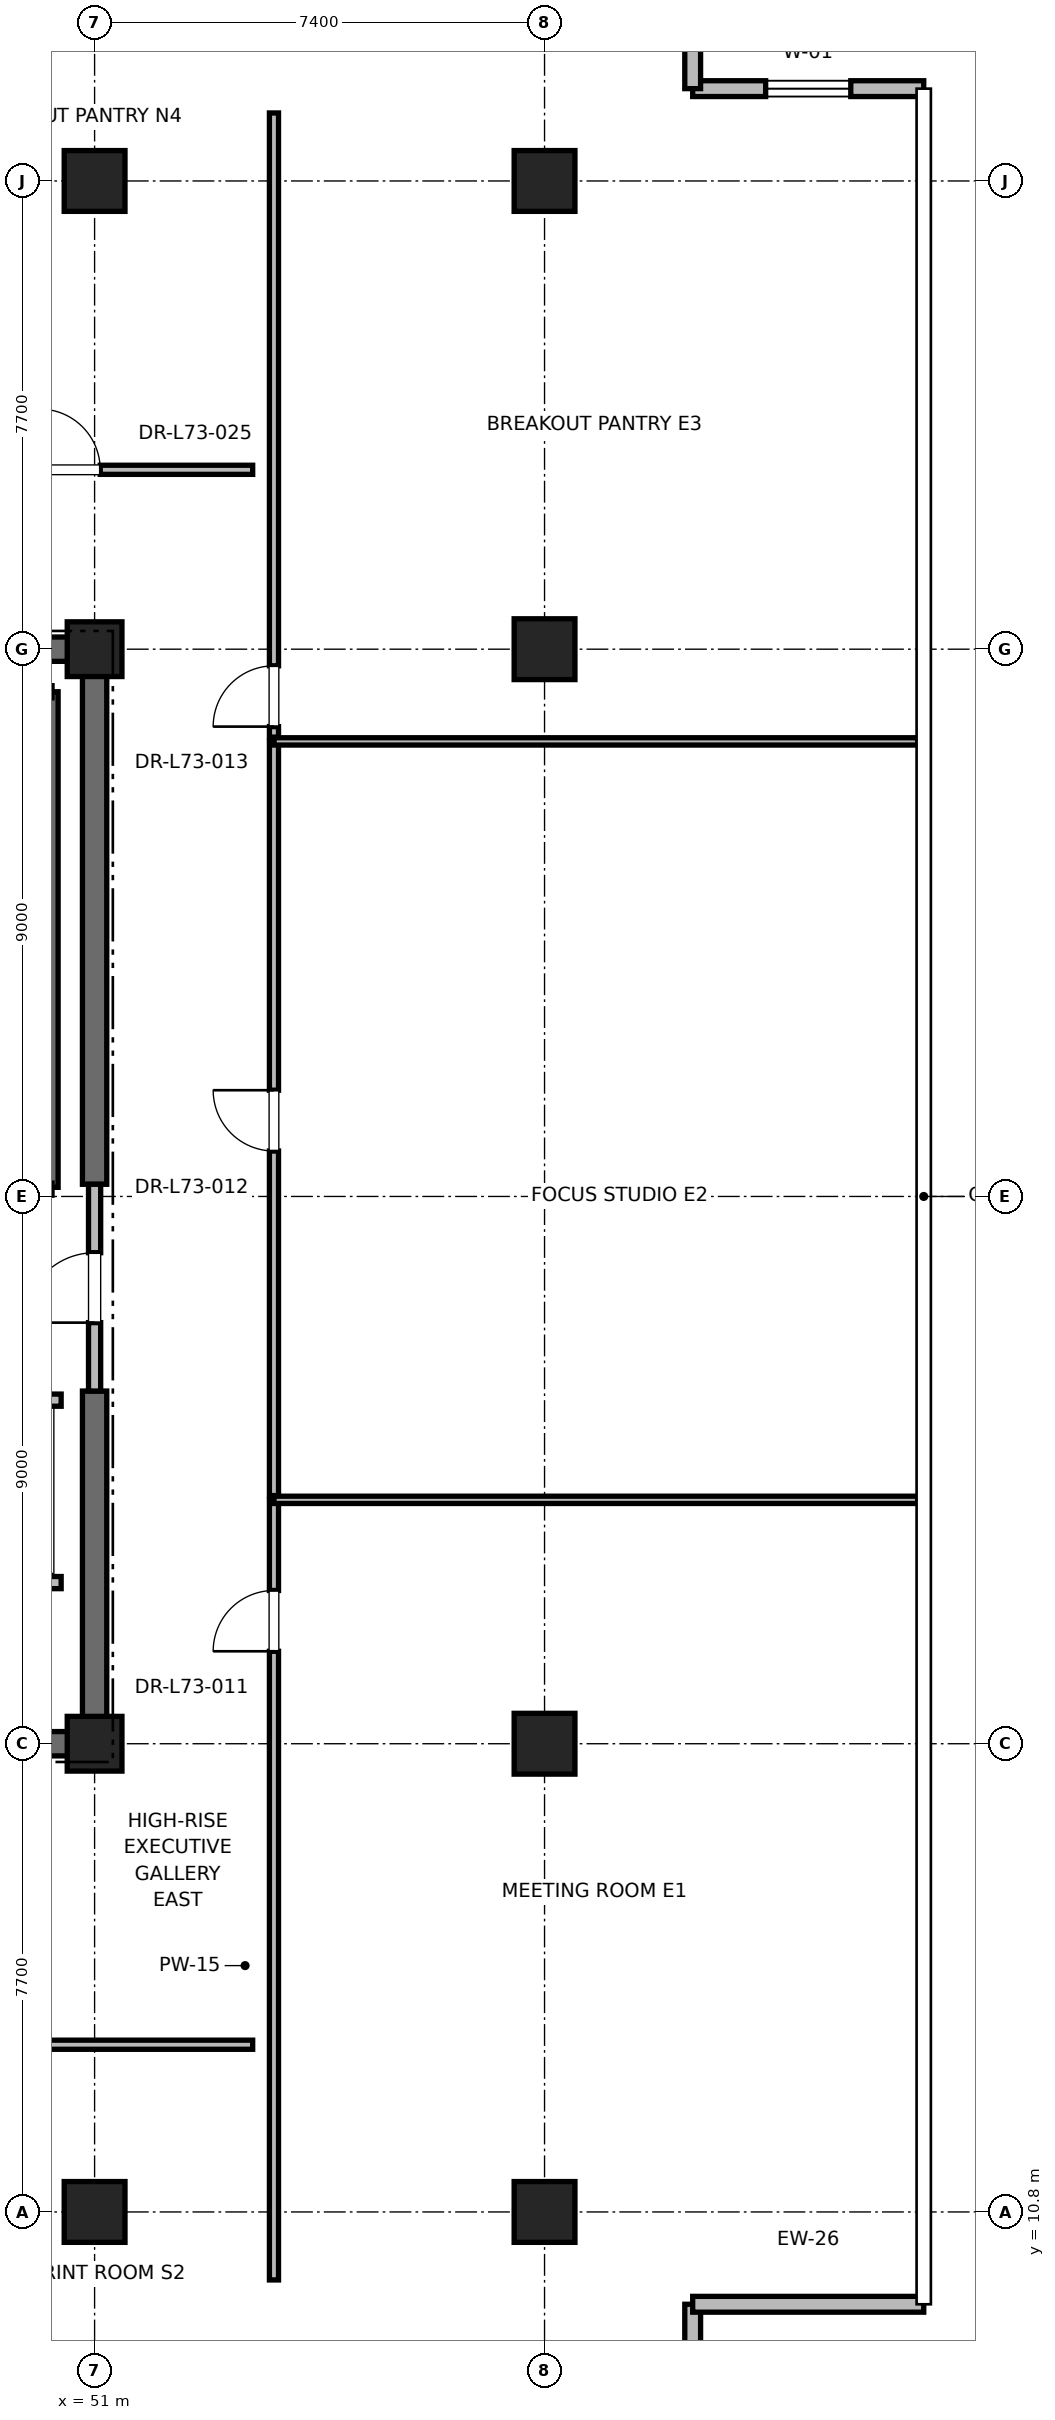
"""IFC4 building model, lengths in metres.
Left out: names, types, materials, properties, quantities, classifications, styles, units other than length and angle.
Written with IfcOpenShell. Run it as: python <this file> out.ifc"""

import sys

from ifc_helpers import new_model, si_unit, direction, frame, frame_2d, origin, origin_2d, place, context, subcontext, project, spatial, rectangle, extrude, element, fill, save


model = new_model("IFC4")
c1 = context("Model", 3, precision=1e-05, world=origin(), true_north=direction((0.0, 1.0)))
c2 = subcontext(c1, "Body", "Model", "MODEL_VIEW")
j1 = project(units=[si_unit("LENGTHUNIT", "METRE"), si_unit("PLANEANGLEUNIT", "RADIAN")], contexts=[c1])
p1 = place(None, origin())
s1 = spatial("IfcSite", under=j1, at=p1, CompositionType="ELEMENT")
p2 = place(p1, origin())
s2 = spatial("IfcBuilding", under=s1, at=p2, CompositionType="ELEMENT")
p3 = place(p2, frame((0.0, 0.0, 314.8)))
s3 = spatial("IfcBuildingStorey", under=s2, at=p3, CompositionType="ELEMENT", Elevation=314.8)
for number, where, z_axis, x_axis in (
    (1, (51.0, 10.8, 0.0), (0.0, 0.0, 1.0), (1.0, 0.0, 0.0)),
    (2, (51.0, 44.2, 0.0), (0.0, 0.0, 1.0), (1.0, 0.0, 0.0)),
    (3, (58.4, 18.5, 0.0), (0.0, 0.0, 1.0), (1.0, 0.0, 0.0)),
    (4, (58.4, 36.5, 0.0), (0.0, 0.0, 1.0), (1.0, 0.0, 0.0)),
    (5, (58.4, 10.8, 0.0), (0.0, 0.0, 1.0), (1.0, 0.0, 0.0)),
    (6, (58.4, 44.2, 0.0), (0.0, 0.0, 1.0), (1.0, 0.0, 0.0)),
):
    element("IfcColumn", number, at=place(p3, frame(where, z_axis=z_axis, x_axis=x_axis)), inside=s3, PredefinedType="COLUMN", context=c2, shape_type="SweptSolid", body=[
        extrude(rectangle(XDim=1.0, YDim=1.0, at=origin_2d()), origin(), (0.0, 0.0, 1.0), 4.0),
    ])
for number, where, z_axis, x_axis in (
    (7, (51.0, 18.5, 0.0), (0.0, 0.0, 1.0), (1.0, 0.0, 0.0)),
    (8, (51.0, 36.5, 0.0), (0.0, 0.0, 1.0), (1.0, 0.0, 0.0)),
):
    element("IfcColumn", number, at=place(p3, frame(where, z_axis=z_axis, x_axis=x_axis)), inside=s3, PredefinedType="PILASTER", context=c2, shape_type="SweptSolid", body=[
        extrude(rectangle(XDim=0.9, YDim=0.9, at=origin_2d()), origin(), (0.0, 0.0, 1.0), 4.0),
    ])
p4 = place(p3, frame((41.8, 18.5, 0.0), z_axis=(0.0, 0.0, 1.0), x_axis=(1.0, 0.0, 0.0)))
e9 = element("IfcWall", 9, at=p4, inside=s3, PredefinedType="SHEAR", context=c2, shape_type="SweptSolid", body=[
    extrude(rectangle(XDim=9.2, YDim=0.4, at=frame_2d((4.6, 0.0))), origin(), (0.0, 0.0, 1.0), 3.785),
])
for number, where, z_axis, x_axis in (
    (10, (45.2, 36.5, 0.0), (0.0, 0.0, 1.0), (1.0, 0.0, 0.0)),
    (11, (51.0, 18.5, 0.0), (0.0, 0.0, 1.0), (0.0, 1.0, 0.0)),
):
    element("IfcWall", number, at=place(p3, frame(where, z_axis=z_axis, x_axis=x_axis)), inside=s3, PredefinedType="SHEAR", context=c2, shape_type="SweptSolid", body=[
        extrude(rectangle(XDim=5.8, YDim=0.4, at=frame_2d((2.9, 0.0))), origin(), (0.0, 0.0, 1.0), 3.785),
    ])
p5 = place(p3, frame((51.0, 27.7, 0.0), z_axis=(0.0, 0.0, 1.0), x_axis=(0.0, 1.0, 0.0)))
e12 = element("IfcWall", 12, at=p5, inside=s3, PredefinedType="SHEAR", context=c2, shape_type="SweptSolid", body=[
    extrude(rectangle(XDim=8.8, YDim=0.4, at=frame_2d((4.4, 0.0))), origin(), (0.0, 0.0, 1.0), 3.785),
])
p6 = place(p3, frame((60.836, 5.982, 0.0), z_axis=(0.0, 0.0, 1.0), x_axis=(0.0, 1.0, 0.0)))
e13 = element("IfcWall", 13, at=p6, inside=s3, PredefinedType="PARAPET", context=c2, shape_type="SweptSolid", body=[
    extrude(rectangle(XDim=3.3, YDim=0.26, at=frame_2d((1.65, 0.0))), origin(), (0.0, 0.0, 1.0), 3.785),
])
p7 = place(p6, frame((0.95, 0.0, 0.85)))
e14 = element("IfcOpeningElement", 14, at=p7, cuts=e13, PredefinedType="OPENING", context=c2, shape_type="SweptSolid", body=[
    extrude(rectangle(XDim=1.4, YDim=2.0, at=frame_2d((0.7, 1.0))), frame((0.0, 0.13, 0.0), z_axis=(0.0, -1.0, 0.0), x_axis=(1.0, 0.0, 0.0)), (0.0, 0.0, 1.0), 0.26),
])
p8 = place(p3, frame((60.836, 9.282, 0.0), z_axis=(0.0, 0.0, 1.0), x_axis=(1.0, 0.0, 0.0)))
e15 = element("IfcWall", 15, at=p8, inside=s3, PredefinedType="PARAPET", context=c2, shape_type="SweptSolid", body=[
    extrude(rectangle(XDim=3.8, YDim=0.26, at=frame_2d((1.9, 0.0))), origin(), (0.0, 0.0, 1.0), 3.785),
])
p9 = place(p3, frame((64.636, 45.718, 0.0), z_axis=(0.0, 0.0, 1.0), x_axis=(-1.0, 0.0, 0.0)))
e16 = element("IfcWall", 16, at=p9, inside=s3, PredefinedType="PARAPET", context=c2, shape_type="SweptSolid", body=[
    extrude(rectangle(XDim=3.8, YDim=0.26, at=frame_2d((1.9, 0.0))), origin(), (0.0, 0.0, 1.0), 3.785),
])
p10 = place(p9, frame((1.2, 0.0, 0.85)))
e17 = element("IfcOpeningElement", 17, at=p10, cuts=e16, PredefinedType="OPENING", context=c2, shape_type="SweptSolid", body=[
    extrude(rectangle(XDim=1.4, YDim=2.0, at=frame_2d((0.7, 1.0))), frame((0.0, 0.13, 0.0), z_axis=(0.0, -1.0, 0.0), x_axis=(1.0, 0.0, 0.0)), (0.0, 0.0, 1.0), 0.26),
])
p11 = place(p3, frame((60.836, 45.718, 0.0), z_axis=(0.0, 0.0, 1.0), x_axis=(0.0, 1.0, 0.0)))
e18 = element("IfcWall", 18, at=p11, inside=s3, PredefinedType="PARAPET", context=c2, shape_type="SweptSolid", body=[
    extrude(rectangle(XDim=3.3, YDim=0.26, at=frame_2d((1.65, 0.0))), origin(), (0.0, 0.0, 1.0), 3.785),
])
p12 = place(p3, frame((50.3, 27.65, 0.0), z_axis=(0.0, 0.0, 1.0), x_axis=(0.0, 1.0, 0.0)))
e19 = element("IfcWall", 19, at=p12, inside=s3, PredefinedType="SOLIDWALL", context=c2, shape_type="SweptSolid", body=[
    extrude(rectangle(XDim=8.15, YDim=0.2, at=frame_2d((4.075, 0.0))), origin(), (0.0, 0.0, 1.0), 3.785),
])
p13 = place(p3, frame((51.0, 24.3, 0.0), z_axis=(0.0, 0.0, 1.0), x_axis=(0.0, 1.0, 0.0)))
e20 = element("IfcWall", 20, at=p13, inside=s3, PredefinedType="PARTITIONING", context=c2, shape_type="SweptSolid", body=[
    extrude(rectangle(XDim=3.4, YDim=0.2, at=frame_2d((1.7, 0.0))), origin(), (0.0, 0.0, 1.0), 2.865),
])
p14 = place(p13, frame((1.125, 0.0, 0.0)))
e21 = element("IfcOpeningElement", 21, at=p14, cuts=e20, PredefinedType="OPENING", context=c2, shape_type="SweptSolid", body=[
    extrude(rectangle(XDim=1.15, YDim=2.2, at=frame_2d((0.575, 1.1))), frame((0.0, 0.1, 0.0), z_axis=(0.0, -1.0, 0.0), x_axis=(1.0, 0.0, 0.0)), (0.0, 0.0, 1.0), 0.2),
])
p15 = place(p3, frame((47.85, 21.15, 0.0), z_axis=(0.0, 0.0, 1.0), x_axis=(1.0, 0.0, 0.0)))
e22 = element("IfcWall", 22, at=p15, inside=s3, PredefinedType="SOLIDWALL", context=c2, shape_type="SweptSolid", body=[
    extrude(rectangle(XDim=2.6, YDim=0.2, at=frame_2d((1.3, 0.0))), origin(), (0.0, 0.0, 1.0), 3.785),
])
p16 = place(p3, frame((50.45, 24.15, 0.0), z_axis=(0.0, 0.0, 1.0), x_axis=(-1.0, 0.0, 0.0)))
e23 = element("IfcWall", 23, at=p16, inside=s3, PredefinedType="SOLIDWALL", context=c2, shape_type="SweptSolid", body=[
    extrude(rectangle(XDim=2.6, YDim=0.2, at=frame_2d((1.3, 0.0))), origin(), (0.0, 0.0, 1.0), 2.865),
])
p17 = place(p16, frame((0.75, 0.0, 0.0)))
e24 = element("IfcOpeningElement", 24, at=p17, cuts=e23, PredefinedType="OPENING", context=c2, shape_type="SweptSolid", body=[
    extrude(rectangle(XDim=1.1, YDim=2.2, at=frame_2d((0.55, 1.1))), frame((0.0, 0.1, 0.0), z_axis=(0.0, -1.0, 0.0), x_axis=(1.0, 0.0, 0.0)), (0.0, 0.0, 1.0), 0.2),
])
p18 = place(p3, frame((47.686, 39.45, 0.0), z_axis=(0.0, 0.0, 1.0), x_axis=(1.0, 0.0, 0.0)))
e25 = element("IfcWall", 25, at=p18, inside=s3, PredefinedType="PARTITIONING", context=c2, shape_type="SweptSolid", body=[
    extrude(rectangle(XDim=5.914, YDim=0.15, at=frame_2d((2.957, 0.0))), origin(), (0.0, 0.0, 1.0), 2.85),
])
p19 = place(p18, frame((2.407, 0.0, 0.0)))
e26 = element("IfcOpeningElement", 26, at=p19, cuts=e25, PredefinedType="OPENING", context=c2, shape_type="SweptSolid", body=[
    extrude(rectangle(XDim=1.0, YDim=2.15, at=frame_2d((0.5, 1.075))), frame((0.0, 0.075, 0.0), z_axis=(0.0, -1.0, 0.0), x_axis=(1.0, 0.0, 0.0)), (0.0, 0.0, 1.0), 0.15),
])
p20 = place(p3, frame((38.438, 13.55, 0.0), z_axis=(0.0, 0.0, 1.0), x_axis=(1.0, 0.0, 0.0)))
e27 = element("IfcWall", 27, at=p20, inside=s3, PredefinedType="PARTITIONING", context=c2, shape_type="SweptSolid", body=[
    extrude(rectangle(XDim=15.162, YDim=0.15, at=frame_2d((7.581, 0.0))), origin(), (0.0, 0.0, 1.0), 2.85),
])
p21 = place(p20, frame((7.031, 0.0, 0.0)))
e28 = element("IfcOpeningElement", 28, at=p21, cuts=e27, PredefinedType="OPENING", context=c2, shape_type="SweptSolid", body=[
    extrude(rectangle(XDim=1.0, YDim=2.15, at=frame_2d((0.5, 1.075))), frame((0.0, 0.075, 0.0), z_axis=(0.0, -1.0, 0.0), x_axis=(1.0, 0.0, 0.0)), (0.0, 0.0, 1.0), 0.15),
])
p22 = place(p3, frame((53.95, 9.682, 0.0), z_axis=(0.0, 0.0, 1.0), x_axis=(0.0, 1.0, 0.0)))
e29 = element("IfcWall", 29, at=p22, inside=s3, PredefinedType="PARTITIONING", context=c2, shape_type="SweptSolid", body=[
    extrude(rectangle(XDim=12.829, YDim=0.15, at=frame_2d((6.415, 0.0))), origin(), (0.0, 0.0, 1.0), 2.85),
])
p23 = place(p22, frame((10.339, 0.0, 0.0)))
e30 = element("IfcOpeningElement", 30, at=p23, cuts=e29, PredefinedType="OPENING", context=c2, shape_type="SweptSolid", body=[
    extrude(rectangle(XDim=1.0, YDim=2.15, at=frame_2d((0.5, 1.075))), frame((0.0, 0.075, 0.0), z_axis=(0.0, -1.0, 0.0), x_axis=(1.0, 0.0, 0.0)), (0.0, 0.0, 1.0), 0.15),
])
p24 = place(p3, frame((53.95, 22.511, 0.0), z_axis=(0.0, 0.0, 1.0), x_axis=(1.0, 0.0, 0.0)))
e31 = element("IfcWall", 31, at=p24, inside=s3, PredefinedType="PARTITIONING", context=c2, shape_type="SweptSolid", body=[
    extrude(rectangle(XDim=10.586, YDim=0.12, at=frame_2d((5.293, 0.0))), origin(), (0.0, 0.0, 1.0), 2.85),
])
p25 = place(p3, frame((53.95, 22.581, 0.0), z_axis=(0.0, 0.0, 1.0), x_axis=(0.0, 1.0, 0.0)))
e32 = element("IfcWall", 32, at=p25, inside=s3, PredefinedType="PARTITIONING", context=c2, shape_type="SweptSolid", body=[
    extrude(rectangle(XDim=12.403, YDim=0.15, at=frame_2d((6.201, 0.0))), origin(), (0.0, 0.0, 1.0), 2.85),
])
p26 = place(p25, frame((5.667, 0.0, 0.0)))
e33 = element("IfcOpeningElement", 33, at=p26, cuts=e32, PredefinedType="OPENING", context=c2, shape_type="SweptSolid", body=[
    extrude(rectangle(XDim=1.0, YDim=2.15, at=frame_2d((0.5, 1.075))), frame((0.0, 0.075, 0.0), z_axis=(0.0, -1.0, 0.0), x_axis=(1.0, 0.0, 0.0)), (0.0, 0.0, 1.0), 0.15),
])
p27 = place(p3, frame((53.95, 34.984, 0.0), z_axis=(0.0, 0.0, 1.0), x_axis=(1.0, 0.0, 0.0)))
e34 = element("IfcWall", 34, at=p27, inside=s3, PredefinedType="PARTITIONING", context=c2, shape_type="SweptSolid", body=[
    extrude(rectangle(XDim=10.586, YDim=0.12, at=frame_2d((5.293, 0.0))), origin(), (0.0, 0.0, 1.0), 2.85),
])
p28 = place(p3, frame((53.95, 35.054, 0.0), z_axis=(0.0, 0.0, 1.0), x_axis=(0.0, 1.0, 0.0)))
e35 = element("IfcWall", 35, at=p28, inside=s3, PredefinedType="PARTITIONING", context=c2, shape_type="SweptSolid", body=[
    extrude(rectangle(XDim=10.264, YDim=0.15, at=frame_2d((5.132, 0.0))), origin(), (0.0, 0.0, 1.0), 2.85),
])
p29 = place(p28, frame((0.173, 0.0, 0.0)))
e36 = element("IfcOpeningElement", 36, at=p29, cuts=e35, PredefinedType="OPENING", context=c2, shape_type="SweptSolid", body=[
    extrude(rectangle(XDim=1.0, YDim=2.15, at=frame_2d((0.5, 1.075))), frame((0.0, 0.075, 0.0), z_axis=(0.0, -1.0, 0.0), x_axis=(1.0, 0.0, 0.0)), (0.0, 0.0, 1.0), 0.15),
])
p30 = place(p10, origin())
e37 = element("IfcWindow", 37, at=p30, inside=s3, PartitioningType="SINGLE_PANEL", PredefinedType="WINDOW", context=c2, shape_type="SweptSolid", body=[
    extrude(rectangle(XDim=1.4, YDim=2.0, at=frame_2d((0.7, 1.0))), frame((0.0, 0.03, 0.0), z_axis=(0.0, -1.0, 0.0), x_axis=(1.0, 0.0, 0.0)), (0.0, 0.0, 1.0), 0.06),
])
fill(e17, e37)
p31 = place(p14, origin())
e38 = element("IfcDoor", 38, at=p31, inside=s3, OperationType="SINGLE_SWING_LEFT", PredefinedType="DOOR", context=c2, shape_type="SweptSolid", body=[
    extrude(rectangle(XDim=1.15, YDim=2.2, at=frame_2d((0.575, 1.1))), frame((0.0, 0.025, 0.0), z_axis=(0.0, -1.0, 0.0), x_axis=(1.0, 0.0, 0.0)), (0.0, 0.0, 1.0), 0.05),
])
fill(e21, e38)
p32 = place(p19, origin())
e39 = element("IfcDoor", 39, at=p32, inside=s3, OperationType="SINGLE_SWING_LEFT", PredefinedType="DOOR", context=c2, shape_type="SweptSolid", body=[
    extrude(rectangle(XDim=1.0, YDim=2.15, at=frame_2d((0.5, 1.075))), frame((0.0, 0.025, 0.0), z_axis=(0.0, -1.0, 0.0), x_axis=(1.0, 0.0, 0.0)), (0.0, 0.0, 1.0), 0.05),
])
fill(e26, e39)
p33 = place(p23, origin())
e40 = element("IfcDoor", 40, at=p33, inside=s3, OperationType="SINGLE_SWING_LEFT", PredefinedType="DOOR", context=c2, shape_type="SweptSolid", body=[
    extrude(rectangle(XDim=1.0, YDim=2.15, at=frame_2d((0.5, 1.075))), frame((0.0, 0.025, 0.0), z_axis=(0.0, -1.0, 0.0), x_axis=(1.0, 0.0, 0.0)), (0.0, 0.0, 1.0), 0.05),
])
fill(e30, e40)
p34 = place(p26, origin())
e41 = element("IfcDoor", 41, at=p34, inside=s3, OperationType="SINGLE_SWING_RIGHT", PredefinedType="DOOR", context=c2, shape_type="SweptSolid", body=[
    extrude(rectangle(XDim=1.0, YDim=2.15, at=frame_2d((0.5, 1.075))), frame((0.0, 0.025, 0.0), z_axis=(0.0, -1.0, 0.0), x_axis=(1.0, 0.0, 0.0)), (0.0, 0.0, 1.0), 0.05),
])
fill(e33, e41)
p35 = place(p29, origin())
e42 = element("IfcDoor", 42, at=p35, inside=s3, OperationType="SINGLE_SWING_LEFT", PredefinedType="DOOR", context=c2, shape_type="SweptSolid", body=[
    extrude(rectangle(XDim=1.0, YDim=2.15, at=frame_2d((0.5, 1.075))), frame((0.0, 0.025, 0.0), z_axis=(0.0, -1.0, 0.0), x_axis=(1.0, 0.0, 0.0)), (0.0, 0.0, 1.0), 0.05),
])
fill(e36, e42)
save(model, sys.argv[1])
